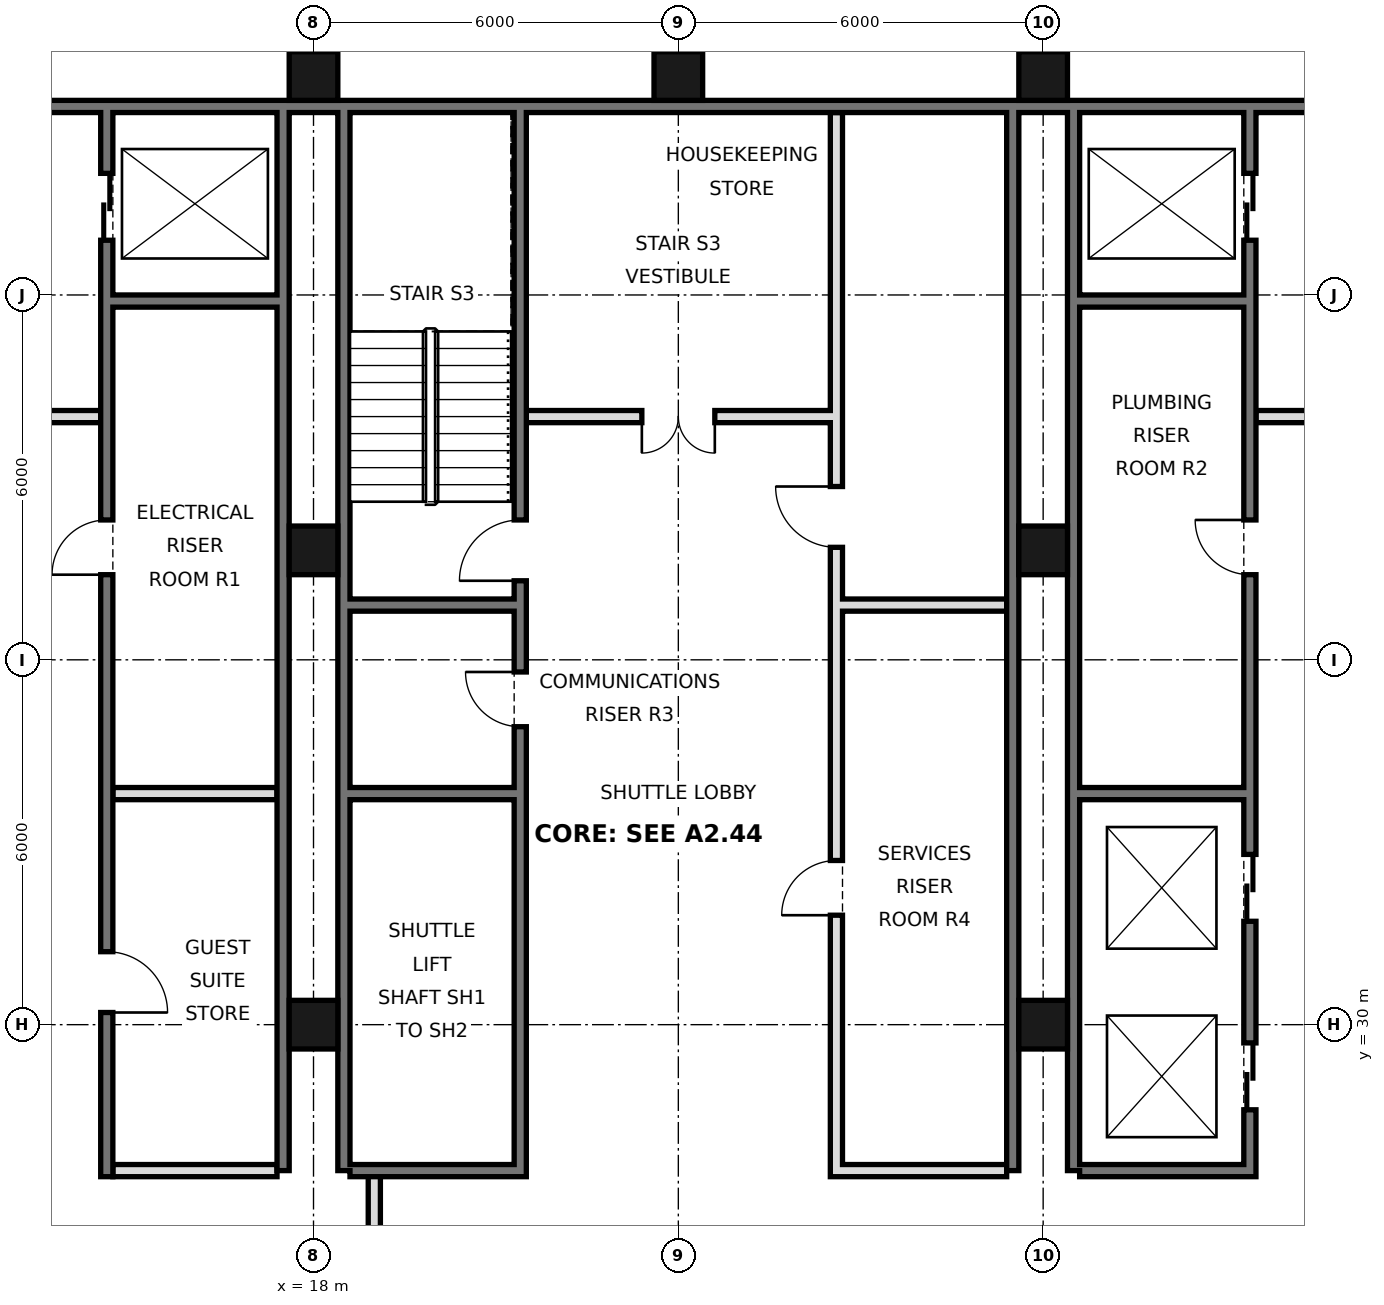
"""IFC4 building model, lengths in metres.
Left out: names, types, materials, properties, quantities, classifications, styles, units other than length and angle.
Written with IfcOpenShell. Run it as: python <this file> out.ifc"""

import sys

from ifc_helpers import new_model, si_unit, direction, frame, frame_2d, origin, origin_2d, place, context, subcontext, project, spatial, rectangle, hollow_rectangle, extrude, element, fill, save


model = new_model("IFC4")
c1 = context("Model", 3, precision=1e-05, world=origin(), true_north=direction((0.0, 1.0)))
c2 = subcontext(c1, "Body", "Model", "MODEL_VIEW")
j1 = project(units=[si_unit("LENGTHUNIT", "METRE"), si_unit("PLANEANGLEUNIT", "RADIAN")], contexts=[c1])
p1 = place(None, origin())
s1 = spatial("IfcSite", under=j1, at=p1, CompositionType="ELEMENT")
p2 = place(p1, origin())
s2 = spatial("IfcBuilding", under=s1, at=p2, CompositionType="ELEMENT")
p3 = place(p2, frame((0.0, 0.0, 174.4)))
s3 = spatial("IfcBuildingStorey", under=s2, at=p3, CompositionType="ELEMENT", Elevation=174.4)
for number, where, z_axis, x_axis in (
    (1, (18.0, 30.0, 0.0), (0.0, 0.0, 1.0), (1.0, 0.0, 0.0)),
    (2, (18.0, 37.8, 0.0), (0.0, 0.0, 1.0), (1.0, 0.0, 0.0)),
    (3, (18.0, 45.6, 0.0), (0.0, 0.0, 1.0), (1.0, 0.0, 0.0)),
    (4, (24.0, 45.6, 0.0), (0.0, 0.0, 1.0), (1.0, 0.0, 0.0)),
    (5, (30.0, 30.0, 0.0), (0.0, 0.0, 1.0), (1.0, 0.0, 0.0)),
    (6, (30.0, 37.8, 0.0), (0.0, 0.0, 1.0), (1.0, 0.0, 0.0)),
    (7, (30.0, 45.6, 0.0), (0.0, 0.0, 1.0), (1.0, 0.0, 0.0)),
):
    element("IfcColumn", number, at=place(p3, frame(where, z_axis=z_axis, x_axis=x_axis)), inside=s3, PredefinedType="COLUMN", context=c2, shape_type="SweptSolid", body=[
        extrude(hollow_rectangle(XDim=0.8, YDim=0.8, WallThickness=0.045, at=origin_2d()), origin(), (0.0, 0.0, 1.0), 3.6),
    ])
p4 = place(p3, frame((6.6, 45.1, 0.0), z_axis=(0.0, 0.0, 1.0), x_axis=(1.0, 0.0, 0.0)))
e8 = element("IfcWall", 8, at=p4, inside=s3, PredefinedType="SOLIDWALL", context=c2, shape_type="SweptSolid", body=[
    extrude(rectangle(XDim=34.8, YDim=0.2, at=frame_2d((17.4, 0.0))), origin(), (0.0, 0.0, 1.0), 3.42),
])
for number, where, z_axis, x_axis in (
    (9, (17.5, 27.6, 0.0), (0.0, 0.0, 1.0), (0.0, 1.0, 0.0)),
    (10, (18.5, 27.6, 0.0), (0.0, 0.0, 1.0), (0.0, 1.0, 0.0)),
    (11, (29.5, 27.6, 0.0), (0.0, 0.0, 1.0), (0.0, 1.0, 0.0)),
    (12, (30.5, 27.6, 0.0), (0.0, 0.0, 1.0), (0.0, 1.0, 0.0)),
):
    element("IfcWall", number, at=place(p3, frame(where, z_axis=z_axis, x_axis=x_axis)), inside=s3, PredefinedType="SOLIDWALL", context=c2, shape_type="SweptSolid", body=[
        extrude(rectangle(XDim=17.5, YDim=0.2, at=frame_2d((8.75, 0.0))), origin(), (0.0, 0.0, 1.0), 3.42),
    ])
p5 = place(p3, frame((19.0, 21.6, 0.0), z_axis=(0.0, 0.0, 1.0), x_axis=(0.0, 1.0, 0.0)))
e13 = element("IfcWall", 13, at=p5, inside=s3, PredefinedType="PARTITIONING", context=c2, shape_type="SweptSolid", body=[
    extrude(rectangle(XDim=6.0, YDim=0.2, at=frame_2d((3.0, 0.0))), origin(), (0.0, 0.0, 1.0), 3.42),
])
p6 = place(p5, frame((2.1, 0.0, 0.0)))
e14 = element("IfcOpeningElement", 14, at=p6, cuts=e13, PredefinedType="OPENING", context=c2, shape_type="SweptSolid", body=[
    extrude(rectangle(XDim=1.8, YDim=2.1, at=frame_2d((0.9, 1.05))), frame((0.0, 0.11, 0.0), z_axis=(0.0, -1.0, 0.0), x_axis=(1.0, 0.0, 0.0)), (0.0, 0.0, 1.0), 0.22),
])
p7 = place(p3, frame((14.6, 27.5, 0.0), z_axis=(0.0, 0.0, 1.0), x_axis=(0.0, 1.0, 0.0)))
e15 = element("IfcWall", 15, at=p7, inside=s3, PredefinedType="SOLIDWALL", context=c2, shape_type="SweptSolid", body=[
    extrude(rectangle(XDim=17.5, YDim=0.2, at=frame_2d((8.75, 0.0))), origin(), (0.0, 0.0, 1.0), 3.42),
])
p8 = place(p7, frame((15.4, 0.0, 0.0)))
e16 = element("IfcOpeningElement", 16, at=p8, cuts=e15, PredefinedType="OPENING", context=c2, shape_type="SweptSolid", body=[
    extrude(rectangle(XDim=1.1, YDim=2.1, at=frame_2d((0.55, 1.05))), frame((0.0, 0.11, 0.0), z_axis=(0.0, -1.0, 0.0), x_axis=(1.0, 0.0, 0.0)), (0.0, 0.0, 1.0), 0.22),
])
p9 = place(p7, frame((2.7, 0.0, 0.0)))
e17 = element("IfcOpeningElement", 17, at=p9, cuts=e15, PredefinedType="OPENING", context=c2, shape_type="SweptSolid", body=[
    extrude(rectangle(XDim=1.0, YDim=2.1, at=frame_2d((0.5, 1.05))), frame((0.0, 0.11, 0.0), z_axis=(0.0, -1.0, 0.0), x_axis=(1.0, 0.0, 0.0)), (0.0, 0.0, 1.0), 0.22),
])
p10 = place(p7, frame((9.9, 0.0, 0.0)))
e18 = element("IfcOpeningElement", 18, at=p10, cuts=e15, PredefinedType="OPENING", context=c2, shape_type="SweptSolid", body=[
    extrude(rectangle(XDim=0.9, YDim=2.1, at=frame_2d((0.45, 1.05))), frame((0.0, 0.11, 0.0), z_axis=(0.0, -1.0, 0.0), x_axis=(1.0, 0.0, 0.0)), (0.0, 0.0, 1.0), 0.22),
])
p11 = place(p3, frame((21.4, 27.5, 0.0), z_axis=(0.0, 0.0, 1.0), x_axis=(0.0, 1.0, 0.0)))
e19 = element("IfcWall", 19, at=p11, inside=s3, PredefinedType="SOLIDWALL", context=c2, shape_type="SweptSolid", body=[
    extrude(rectangle(XDim=17.5, YDim=0.2, at=frame_2d((8.75, 0.0))), origin(), (0.0, 0.0, 1.0), 3.42),
])
p12 = place(p11, frame((9.8, 0.0, 0.0)))
e20 = element("IfcOpeningElement", 20, at=p12, cuts=e19, PredefinedType="OPENING", context=c2, shape_type="SweptSolid", body=[
    extrude(rectangle(XDim=1.0, YDim=2.1, at=frame_2d((0.5, 1.05))), frame((0.0, 0.11, 0.0), z_axis=(0.0, -1.0, 0.0), x_axis=(1.0, 0.0, 0.0)), (0.0, 0.0, 1.0), 0.22),
])
p13 = place(p11, frame((7.4, 0.0, 0.0)))
e21 = element("IfcOpeningElement", 21, at=p13, cuts=e19, PredefinedType="OPENING", context=c2, shape_type="SweptSolid", body=[
    extrude(rectangle(XDim=0.9, YDim=2.1, at=frame_2d((0.45, 1.05))), frame((0.0, 0.11, 0.0), z_axis=(0.0, -1.0, 0.0), x_axis=(1.0, 0.0, 0.0)), (0.0, 0.0, 1.0), 0.22),
])
p14 = place(p3, frame((26.6, 27.5, 0.0), z_axis=(0.0, 0.0, 1.0), x_axis=(0.0, 1.0, 0.0)))
e22 = element("IfcWall", 22, at=p14, inside=s3, PredefinedType="SOLIDWALL", context=c2, shape_type="SweptSolid", body=[
    extrude(rectangle(XDim=17.5, YDim=0.2, at=frame_2d((8.75, 0.0))), origin(), (0.0, 0.0, 1.0), 3.42),
])
p15 = place(p14, frame((4.3, 0.0, 0.0)))
e23 = element("IfcOpeningElement", 23, at=p15, cuts=e22, PredefinedType="OPENING", context=c2, shape_type="SweptSolid", body=[
    extrude(rectangle(XDim=0.9, YDim=2.1, at=frame_2d((0.45, 1.05))), frame((0.0, 0.11, 0.0), z_axis=(0.0, -1.0, 0.0), x_axis=(1.0, 0.0, 0.0)), (0.0, 0.0, 1.0), 0.22),
])
p16 = place(p14, frame((10.35, 0.0, 0.0)))
e24 = element("IfcOpeningElement", 24, at=p16, cuts=e22, PredefinedType="OPENING", context=c2, shape_type="SweptSolid", body=[
    extrude(rectangle(XDim=1.0, YDim=2.1, at=frame_2d((0.5, 1.05))), frame((0.0, 0.11, 0.0), z_axis=(0.0, -1.0, 0.0), x_axis=(1.0, 0.0, 0.0)), (0.0, 0.0, 1.0), 0.22),
])
p17 = place(p3, frame((33.4, 27.5, 0.0), z_axis=(0.0, 0.0, 1.0), x_axis=(0.0, 1.0, 0.0)))
e25 = element("IfcWall", 25, at=p17, inside=s3, PredefinedType="SOLIDWALL", context=c2, shape_type="SweptSolid", body=[
    extrude(rectangle(XDim=17.5, YDim=0.2, at=frame_2d((8.75, 0.0))), origin(), (0.0, 0.0, 1.0), 3.42),
])
p18 = place(p17, frame((1.1, 0.0, 0.0)))
e26 = element("IfcOpeningElement", 26, at=p18, cuts=e25, PredefinedType="OPENING", context=c2, shape_type="SweptSolid", body=[
    extrude(rectangle(XDim=1.1, YDim=2.1, at=frame_2d((0.55, 1.05))), frame((0.0, 0.11, 0.0), z_axis=(0.0, -1.0, 0.0), x_axis=(1.0, 0.0, 0.0)), (0.0, 0.0, 1.0), 0.22),
])
p19 = place(p17, frame((4.2, 0.0, 0.0)))
e27 = element("IfcOpeningElement", 27, at=p19, cuts=e25, PredefinedType="OPENING", context=c2, shape_type="SweptSolid", body=[
    extrude(rectangle(XDim=1.1, YDim=2.1, at=frame_2d((0.55, 1.05))), frame((0.0, 0.11, 0.0), z_axis=(0.0, -1.0, 0.0), x_axis=(1.0, 0.0, 0.0)), (0.0, 0.0, 1.0), 0.22),
])
p20 = place(p17, frame((15.4, 0.0, 0.0)))
e28 = element("IfcOpeningElement", 28, at=p20, cuts=e25, PredefinedType="OPENING", context=c2, shape_type="SweptSolid", body=[
    extrude(rectangle(XDim=1.1, YDim=2.1, at=frame_2d((0.55, 1.05))), frame((0.0, 0.11, 0.0), z_axis=(0.0, -1.0, 0.0), x_axis=(1.0, 0.0, 0.0)), (0.0, 0.0, 1.0), 0.22),
])
p21 = place(p17, frame((9.9, 0.0, 0.0)))
e29 = element("IfcOpeningElement", 29, at=p21, cuts=e25, PredefinedType="OPENING", context=c2, shape_type="SweptSolid", body=[
    extrude(rectangle(XDim=0.9, YDim=2.1, at=frame_2d((0.45, 1.05))), frame((0.0, 0.11, 0.0), z_axis=(0.0, -1.0, 0.0), x_axis=(1.0, 0.0, 0.0)), (0.0, 0.0, 1.0), 0.22),
])
p22 = place(p3, frame((14.7, 27.6, 0.0), z_axis=(0.0, 0.0, 1.0), x_axis=(1.0, 0.0, 0.0)))
e30 = element("IfcWall", 30, at=p22, inside=s3, PredefinedType="PARTITIONING", context=c2, shape_type="SweptSolid", body=[
    extrude(rectangle(XDim=2.7, YDim=0.2, at=frame_2d((1.35, 0.0))), origin(), (0.0, 0.0, 1.0), 3.42),
])
for number, where, z_axis, x_axis in (
    (31, (18.6, 27.6, 0.0), (0.0, 0.0, 1.0), (1.0, 0.0, 0.0)),
    (32, (26.7, 27.6, 0.0), (0.0, 0.0, 1.0), (1.0, 0.0, 0.0)),
    (33, (30.6, 27.6, 0.0), (0.0, 0.0, 1.0), (1.0, 0.0, 0.0)),
    (34, (14.7, 33.8, 0.0), (0.0, 0.0, 1.0), (1.0, 0.0, 0.0)),
    (35, (18.6, 33.8, 0.0), (0.0, 0.0, 1.0), (1.0, 0.0, 0.0)),
    (36, (30.6, 33.8, 0.0), (0.0, 0.0, 1.0), (1.0, 0.0, 0.0)),
    (37, (18.6, 36.9, 0.0), (0.0, 0.0, 1.0), (1.0, 0.0, 0.0)),
    (38, (26.7, 36.9, 0.0), (0.0, 0.0, 1.0), (1.0, 0.0, 0.0)),
):
    element("IfcWall", number, at=place(p3, frame(where, z_axis=z_axis, x_axis=x_axis)), inside=s3, PredefinedType="SOLIDWALL", context=c2, shape_type="SweptSolid", body=[
        extrude(rectangle(XDim=2.7, YDim=0.2, at=frame_2d((1.35, 0.0))), origin(), (0.0, 0.0, 1.0), 3.42),
    ])
p23 = place(p3, frame((21.5, 40.0, 0.0), z_axis=(0.0, 0.0, 1.0), x_axis=(1.0, 0.0, 0.0)))
e39 = element("IfcWall", 39, at=p23, inside=s3, PredefinedType="PARTITIONING", context=c2, shape_type="SweptSolid", body=[
    extrude(rectangle(XDim=5.0, YDim=0.2, at=frame_2d((2.5, 0.0))), origin(), (0.0, 0.0, 1.0), 3.42),
])
p24 = place(p23, frame((1.9, 0.0, 0.0)))
e40 = element("IfcOpeningElement", 40, at=p24, cuts=e39, PredefinedType="OPENING", context=c2, shape_type="SweptSolid", body=[
    extrude(rectangle(XDim=1.2, YDim=2.1, at=frame_2d((0.6, 1.05))), frame((0.0, 0.11, 0.0), z_axis=(0.0, -1.0, 0.0), x_axis=(1.0, 0.0, 0.0)), (0.0, 0.0, 1.0), 0.22),
])
p25 = place(p3, frame((33.5, 40.0, 0.0), z_axis=(0.0, 0.0, 1.0), x_axis=(1.0, 0.0, 0.0)))
e41 = element("IfcWall", 41, at=p25, inside=s3, PredefinedType="PARTITIONING", context=c2, shape_type="SweptSolid", body=[
    extrude(rectangle(XDim=5.0, YDim=0.2, at=frame_2d((2.5, 0.0))), origin(), (0.0, 0.0, 1.0), 3.42),
])
p26 = place(p25, frame((1.9, 0.0, 0.0)))
e42 = element("IfcOpeningElement", 42, at=p26, cuts=e41, PredefinedType="OPENING", context=c2, shape_type="SweptSolid", body=[
    extrude(rectangle(XDim=1.2, YDim=2.1, at=frame_2d((0.6, 1.05))), frame((0.0, 0.11, 0.0), z_axis=(0.0, -1.0, 0.0), x_axis=(1.0, 0.0, 0.0)), (0.0, 0.0, 1.0), 0.22),
])
p27 = place(p3, frame((9.5, 40.0, 0.0), z_axis=(0.0, 0.0, 1.0), x_axis=(1.0, 0.0, 0.0)))
e43 = element("IfcWall", 43, at=p27, inside=s3, PredefinedType="PARTITIONING", context=c2, shape_type="SweptSolid", body=[
    extrude(rectangle(XDim=5.0, YDim=0.2, at=frame_2d((2.5, 0.0))), origin(), (0.0, 0.0, 1.0), 3.42),
])
p28 = place(p27, frame((1.9, 0.0, 0.0)))
e44 = element("IfcOpeningElement", 44, at=p28, cuts=e43, PredefinedType="OPENING", context=c2, shape_type="SweptSolid", body=[
    extrude(rectangle(XDim=1.2, YDim=2.1, at=frame_2d((0.6, 1.05))), frame((0.0, 0.11, 0.0), z_axis=(0.0, -1.0, 0.0), x_axis=(1.0, 0.0, 0.0)), (0.0, 0.0, 1.0), 0.22),
])
for number, where, z_axis, x_axis in (
    (45, (14.7, 41.9, 0.0), (0.0, 0.0, 1.0), (1.0, 0.0, 0.0)),
    (46, (30.6, 41.9, 0.0), (0.0, 0.0, 1.0), (1.0, 0.0, 0.0)),
):
    element("IfcWall", number, at=place(p3, frame(where, z_axis=z_axis, x_axis=x_axis)), inside=s3, PredefinedType="SOLIDWALL", context=c2, shape_type="SweptSolid", body=[
        extrude(rectangle(XDim=2.7, YDim=0.2, at=frame_2d((1.35, 0.0))), origin(), (0.0, 0.0, 1.0), 3.42),
    ])
p29 = place(p24, frame((1.2, 0.0, 0.0), z_axis=(0.0, 0.0, 1.0), x_axis=(-1.0, 0.0, 0.0)))
e47 = element("IfcDoor", 47, at=p29, inside=s3, OperationType="DOUBLE_DOOR_SINGLE_SWING", PredefinedType="DOOR", context=c2, shape_type="SweptSolid", body=[
    extrude(rectangle(XDim=1.2, YDim=2.1, at=frame_2d((0.6, 1.05))), frame((0.0, 0.025, 0.0), z_axis=(0.0, -1.0, 0.0), x_axis=(1.0, 0.0, 0.0)), (0.0, 0.0, 1.0), 0.05),
])
fill(e40, e47)
p30 = place(p18, origin())
e48 = element("IfcDoor", 48, at=p30, inside=s3, OperationType="DOUBLE_DOOR_SLIDING", PredefinedType="DOOR", context=c2, shape_type="SweptSolid", body=[
    extrude(rectangle(XDim=1.1, YDim=2.1, at=frame_2d((0.55, 1.05))), frame((0.0, 0.025, 0.0), z_axis=(0.0, -1.0, 0.0), x_axis=(1.0, 0.0, 0.0)), (0.0, 0.0, 1.0), 0.05),
])
fill(e26, e48)
p31 = place(p19, origin())
e49 = element("IfcDoor", 49, at=p31, inside=s3, OperationType="DOUBLE_DOOR_SLIDING", PredefinedType="DOOR", context=c2, shape_type="SweptSolid", body=[
    extrude(rectangle(XDim=1.1, YDim=2.1, at=frame_2d((0.55, 1.05))), frame((0.0, 0.025, 0.0), z_axis=(0.0, -1.0, 0.0), x_axis=(1.0, 0.0, 0.0)), (0.0, 0.0, 1.0), 0.05),
])
fill(e27, e49)
p32 = place(p20, origin())
e50 = element("IfcDoor", 50, at=p32, inside=s3, OperationType="DOUBLE_DOOR_SLIDING", PredefinedType="DOOR", context=c2, shape_type="SweptSolid", body=[
    extrude(rectangle(XDim=1.1, YDim=2.1, at=frame_2d((0.55, 1.05))), frame((0.0, 0.025, 0.0), z_axis=(0.0, -1.0, 0.0), x_axis=(1.0, 0.0, 0.0)), (0.0, 0.0, 1.0), 0.05),
])
fill(e28, e50)
p33 = place(p8, origin())
e51 = element("IfcDoor", 51, at=p33, inside=s3, OperationType="DOUBLE_DOOR_SLIDING", PredefinedType="DOOR", context=c2, shape_type="SweptSolid", body=[
    extrude(rectangle(XDim=1.1, YDim=2.1, at=frame_2d((0.55, 1.05))), frame((0.0, 0.025, 0.0), z_axis=(0.0, -1.0, 0.0), x_axis=(1.0, 0.0, 0.0)), (0.0, 0.0, 1.0), 0.05),
])
fill(e16, e51)
p34 = place(p9, frame((1.0, 0.0, 0.0), z_axis=(0.0, 0.0, 1.0), x_axis=(-1.0, 0.0, 0.0)))
e52 = element("IfcDoor", 52, at=p34, inside=s3, OperationType="SINGLE_SWING_RIGHT", PredefinedType="DOOR", context=c2, shape_type="SweptSolid", body=[
    extrude(rectangle(XDim=1.0, YDim=2.1, at=frame_2d((0.5, 1.05))), frame((0.0, 0.025, 0.0), z_axis=(0.0, -1.0, 0.0), x_axis=(1.0, 0.0, 0.0)), (0.0, 0.0, 1.0), 0.05),
])
fill(e17, e52)
p35 = place(p12, origin())
e53 = element("IfcDoor", 53, at=p35, inside=s3, OperationType="SINGLE_SWING_LEFT", PredefinedType="DOOR", context=c2, shape_type="SweptSolid", body=[
    extrude(rectangle(XDim=1.0, YDim=2.1, at=frame_2d((0.5, 1.05))), frame((0.0, 0.025, 0.0), z_axis=(0.0, -1.0, 0.0), x_axis=(1.0, 0.0, 0.0)), (0.0, 0.0, 1.0), 0.05),
])
fill(e20, e53)
p36 = place(p10, origin())
e54 = element("IfcDoor", 54, at=p36, inside=s3, OperationType="SINGLE_SWING_LEFT", PredefinedType="DOOR", context=c2, shape_type="SweptSolid", body=[
    extrude(rectangle(XDim=0.9, YDim=2.1, at=frame_2d((0.45, 1.05))), frame((0.0, 0.025, 0.0), z_axis=(0.0, -1.0, 0.0), x_axis=(1.0, 0.0, 0.0)), (0.0, 0.0, 1.0), 0.05),
])
fill(e18, e54)
p37 = place(p21, frame((0.9, 0.0, 0.0), z_axis=(0.0, 0.0, 1.0), x_axis=(-1.0, 0.0, 0.0)))
e55 = element("IfcDoor", 55, at=p37, inside=s3, OperationType="SINGLE_SWING_LEFT", PredefinedType="DOOR", context=c2, shape_type="SweptSolid", body=[
    extrude(rectangle(XDim=0.9, YDim=2.1, at=frame_2d((0.45, 1.05))), frame((0.0, 0.025, 0.0), z_axis=(0.0, -1.0, 0.0), x_axis=(1.0, 0.0, 0.0)), (0.0, 0.0, 1.0), 0.05),
])
fill(e29, e55)
p38 = place(p13, frame((0.9, 0.0, 0.0), z_axis=(0.0, 0.0, 1.0), x_axis=(-1.0, 0.0, 0.0)))
e56 = element("IfcDoor", 56, at=p38, inside=s3, OperationType="SINGLE_SWING_LEFT", PredefinedType="DOOR", context=c2, shape_type="SweptSolid", body=[
    extrude(rectangle(XDim=0.9, YDim=2.1, at=frame_2d((0.45, 1.05))), frame((0.0, 0.025, 0.0), z_axis=(0.0, -1.0, 0.0), x_axis=(1.0, 0.0, 0.0)), (0.0, 0.0, 1.0), 0.05),
])
fill(e21, e56)
p39 = place(p15, origin())
e57 = element("IfcDoor", 57, at=p39, inside=s3, OperationType="SINGLE_SWING_LEFT", PredefinedType="DOOR", context=c2, shape_type="SweptSolid", body=[
    extrude(rectangle(XDim=0.9, YDim=2.1, at=frame_2d((0.45, 1.05))), frame((0.0, 0.025, 0.0), z_axis=(0.0, -1.0, 0.0), x_axis=(1.0, 0.0, 0.0)), (0.0, 0.0, 1.0), 0.05),
])
fill(e23, e57)
p40 = place(p16, frame((1.0, 0.0, 0.0), z_axis=(0.0, 0.0, 1.0), x_axis=(-1.0, 0.0, 0.0)))
e58 = element("IfcDoor", 58, at=p40, inside=s3, OperationType="SINGLE_SWING_LEFT", PredefinedType="DOOR", context=c2, shape_type="SweptSolid", body=[
    extrude(rectangle(XDim=1.0, YDim=2.1, at=frame_2d((0.5, 1.05))), frame((0.0, 0.025, 0.0), z_axis=(0.0, -1.0, 0.0), x_axis=(1.0, 0.0, 0.0)), (0.0, 0.0, 1.0), 0.05),
])
fill(e24, e58)
save(model, sys.argv[1])
